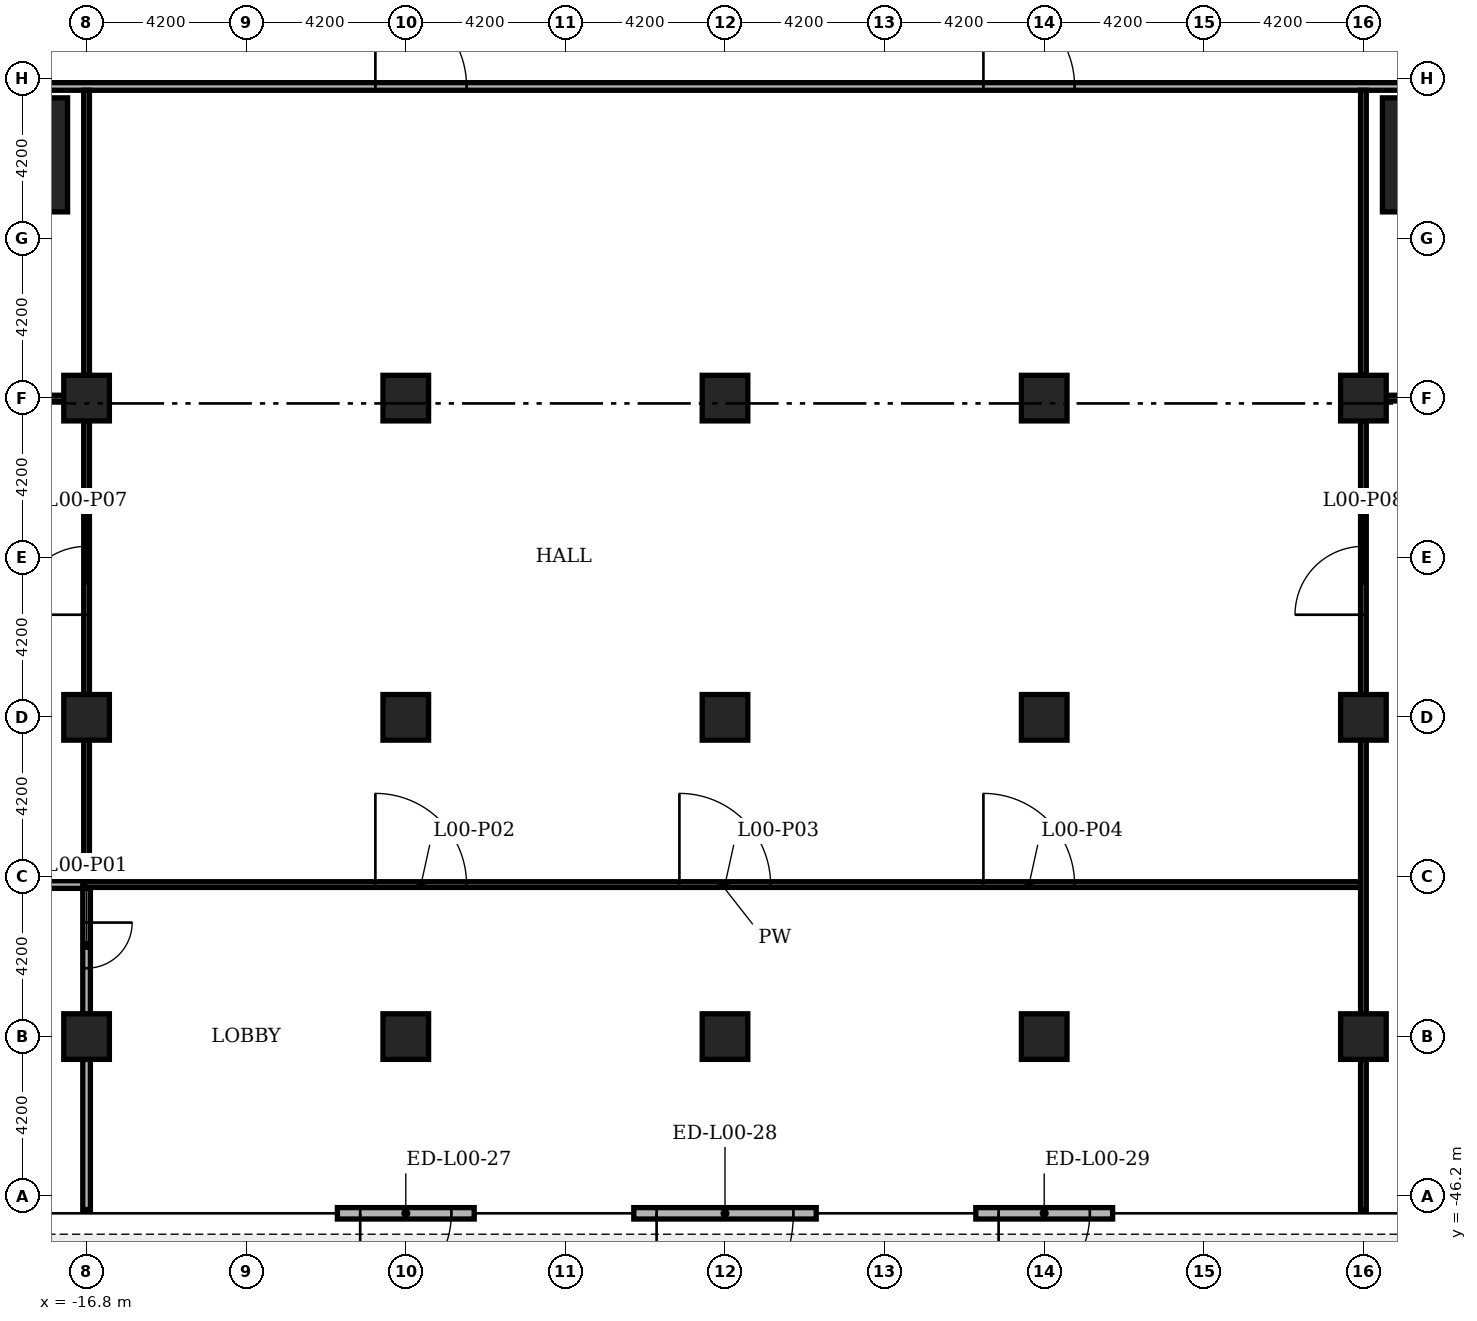
"""IFC4 building model, lengths in metres.
Left out: names, types, materials, properties, quantities, classifications, styles, units other than length and angle.
Written with IfcOpenShell. Run it as: python <this file> out.ifc"""

import sys

from ifc_helpers import new_model, si_unit, direction, frame, frame_2d, origin, origin_2d, place, context, subcontext, project, spatial, rectangle, extrude, element, fill, save


model = new_model("IFC4")
c1 = context("Model", 3, precision=1e-05, world=origin(), true_north=direction((0.0, 1.0)))
c2 = subcontext(c1, "Body", "Model", "MODEL_VIEW")
j1 = project(units=[si_unit("LENGTHUNIT", "METRE"), si_unit("PLANEANGLEUNIT", "RADIAN")], contexts=[c1])
p1 = place(None, origin())
s1 = spatial("IfcSite", under=j1, at=p1, CompositionType="ELEMENT")
p2 = place(p1, origin())
s2 = spatial("IfcBuilding", under=s1, at=p2, CompositionType="ELEMENT")
p3 = place(p2, origin())
s3 = spatial("IfcBuildingStorey", under=s2, at=p3, CompositionType="ELEMENT", Elevation=0.0)
for number, where, z_axis, x_axis in (
    (1, (18.8, -18.8, 0.0), (0.0, 0.0, 1.0), (1.0, 0.0, 0.0)),
    (2, (-18.8, -18.8, 0.0), (0.0, 0.0, 1.0), (1.0, 0.0, 0.0)),
):
    element("IfcColumn", number, at=place(p3, frame(where, z_axis=z_axis, x_axis=x_axis)), inside=s3, PredefinedType="COLUMN", context=c2, shape_type="SweptSolid", body=[
        extrude(rectangle(XDim=3.0, YDim=3.0, at=origin_2d()), origin(), (0.0, 0.0, 1.0), 7.2),
    ])
for number, where, z_axis, x_axis in (
    (3, (0.0, -25.2, 0.0), (0.0, 0.0, 1.0), (1.0, 0.0, 0.0)),
    (4, (8.4, -25.2, 0.0), (0.0, 0.0, 1.0), (1.0, 0.0, 0.0)),
    (5, (16.8, -25.2, 0.0), (0.0, 0.0, 1.0), (1.0, 0.0, 0.0)),
    (6, (-8.4, -25.2, 0.0), (0.0, 0.0, 1.0), (1.0, 0.0, 0.0)),
    (7, (-16.8, -25.2, 0.0), (0.0, 0.0, 1.0), (1.0, 0.0, 0.0)),
    (8, (0.0, -33.6, 0.0), (0.0, 0.0, 1.0), (1.0, 0.0, 0.0)),
    (9, (0.0, -42.0, 0.0), (0.0, 0.0, 1.0), (1.0, 0.0, 0.0)),
    (10, (8.4, -33.6, 0.0), (0.0, 0.0, 1.0), (1.0, 0.0, 0.0)),
    (11, (8.4, -42.0, 0.0), (0.0, 0.0, 1.0), (1.0, 0.0, 0.0)),
    (12, (16.8, -33.6, 0.0), (0.0, 0.0, 1.0), (1.0, 0.0, 0.0)),
    (13, (16.8, -42.0, 0.0), (0.0, 0.0, 1.0), (1.0, 0.0, 0.0)),
    (14, (-8.4, -33.6, 0.0), (0.0, 0.0, 1.0), (1.0, 0.0, 0.0)),
    (15, (-8.4, -42.0, 0.0), (0.0, 0.0, 1.0), (1.0, 0.0, 0.0)),
    (16, (-16.8, -33.6, 0.0), (0.0, 0.0, 1.0), (1.0, 0.0, 0.0)),
    (17, (-16.8, -42.0, 0.0), (0.0, 0.0, 1.0), (1.0, 0.0, 0.0)),
):
    element("IfcColumn", number, at=place(p3, frame(where, z_axis=z_axis, x_axis=x_axis)), inside=s3, PredefinedType="COLUMN", context=c2, shape_type="SweptSolid", body=[
        extrude(rectangle(XDim=1.2, YDim=1.2, at=origin_2d()), origin(), (0.0, 0.0, 1.0), 7.2),
    ])
p4 = place(p3, frame((-10.2, -46.65, 0.0), z_axis=(0.0, 0.0, 1.0), x_axis=(1.0, 0.0, 0.0)))
e18 = element("IfcWall", 18, at=p4, inside=s3, PredefinedType="STANDARD", context=c2, shape_type="SweptSolid", body=[
    extrude(rectangle(XDim=3.6, YDim=0.3, at=frame_2d((1.8, 0.0))), origin(), (0.0, 0.0, 1.0), 6.78),
])
p5 = place(p4, frame((0.6, 0.0, 0.0)))
e19 = element("IfcOpeningElement", 19, at=p5, cuts=e18, PredefinedType="OPENING", context=c2, shape_type="SweptSolid", body=[
    extrude(rectangle(XDim=2.4, YDim=3.6, at=frame_2d((1.2, 1.8))), frame((0.0, 0.16, 0.0), z_axis=(0.0, -1.0, 0.0), x_axis=(1.0, 0.0, 0.0)), (0.0, 0.0, 1.0), 0.32),
])
p6 = place(p3, frame((-2.4, -46.65, 0.0), z_axis=(0.0, 0.0, 1.0), x_axis=(1.0, 0.0, 0.0)))
e20 = element("IfcWall", 20, at=p6, inside=s3, PredefinedType="STANDARD", context=c2, shape_type="SweptSolid", body=[
    extrude(rectangle(XDim=4.8, YDim=0.3, at=frame_2d((2.4, 0.0))), origin(), (0.0, 0.0, 1.0), 6.78),
])
p7 = place(p6, frame((0.6, 0.0, 0.0)))
e21 = element("IfcOpeningElement", 21, at=p7, cuts=e20, PredefinedType="OPENING", context=c2, shape_type="SweptSolid", body=[
    extrude(rectangle(XDim=3.6, YDim=3.6, at=frame_2d((1.8, 1.8))), frame((0.0, 0.16, 0.0), z_axis=(0.0, -1.0, 0.0), x_axis=(1.0, 0.0, 0.0)), (0.0, 0.0, 1.0), 0.32),
])
p8 = place(p3, frame((6.6, -46.65, 0.0), z_axis=(0.0, 0.0, 1.0), x_axis=(1.0, 0.0, 0.0)))
e22 = element("IfcWall", 22, at=p8, inside=s3, PredefinedType="STANDARD", context=c2, shape_type="SweptSolid", body=[
    extrude(rectangle(XDim=3.6, YDim=0.3, at=frame_2d((1.8, 0.0))), origin(), (0.0, 0.0, 1.0), 6.78),
])
p9 = place(p8, frame((0.6, 0.0, 0.0)))
e23 = element("IfcOpeningElement", 23, at=p9, cuts=e22, PredefinedType="OPENING", context=c2, shape_type="SweptSolid", body=[
    extrude(rectangle(XDim=2.4, YDim=3.6, at=frame_2d((1.2, 1.8))), frame((0.0, 0.16, 0.0), z_axis=(0.0, -1.0, 0.0), x_axis=(1.0, 0.0, 0.0)), (0.0, 0.0, 1.0), 0.32),
])
p10 = place(p3, frame((-25.3, -38.0, 0.0), z_axis=(0.0, 0.0, 1.0), x_axis=(1.0, 0.0, 0.0)))
e24 = element("IfcWall", 24, at=p10, inside=s3, PredefinedType="PARTITIONING", context=c2, shape_type="SweptSolid", body=[
    extrude(rectangle(XDim=8.6, YDim=0.2, at=frame_2d((4.3, 0.0))), origin(), (0.0, 0.0, 1.0), 6.38),
])
p11 = place(p3, frame((-16.9, -38.0, 0.0), z_axis=(0.0, 0.0, 1.0), x_axis=(1.0, 0.0, 0.0)))
e25 = element("IfcWall", 25, at=p11, inside=s3, PredefinedType="PARTITIONING", context=c2, shape_type="SweptSolid", body=[
    extrude(rectangle(XDim=33.625, YDim=0.15, at=frame_2d((16.812, 0.0))), origin(), (0.0, 0.0, 1.0), 6.38),
])
p12 = place(p11, frame((7.7, 0.0, 0.0)))
e26 = element("IfcOpeningElement", 26, at=p12, cuts=e25, PredefinedType="OPENING", context=c2, shape_type="SweptSolid", body=[
    extrude(rectangle(XDim=2.4, YDim=2.4, at=frame_2d((1.2, 1.2))), frame((0.0, 0.085, 0.0), z_axis=(0.0, -1.0, 0.0), x_axis=(1.0, 0.0, 0.0)), (0.0, 0.0, 1.0), 0.17),
])
p13 = place(p11, frame((15.7, 0.0, 0.0)))
e27 = element("IfcOpeningElement", 27, at=p13, cuts=e25, PredefinedType="OPENING", context=c2, shape_type="SweptSolid", body=[
    extrude(rectangle(XDim=2.4, YDim=2.4, at=frame_2d((1.2, 1.2))), frame((0.0, 0.085, 0.0), z_axis=(0.0, -1.0, 0.0), x_axis=(1.0, 0.0, 0.0)), (0.0, 0.0, 1.0), 0.17),
])
p14 = place(p11, frame((23.7, 0.0, 0.0)))
e28 = element("IfcOpeningElement", 28, at=p14, cuts=e25, PredefinedType="OPENING", context=c2, shape_type="SweptSolid", body=[
    extrude(rectangle(XDim=2.4, YDim=2.4, at=frame_2d((1.2, 1.2))), frame((0.0, 0.085, 0.0), z_axis=(0.0, -1.0, 0.0), x_axis=(1.0, 0.0, 0.0)), (0.0, 0.0, 1.0), 0.17),
])
for number, where, z_axis, x_axis in (
    (29, (-21.95, -25.2, 0.0), (0.0, 0.0, 1.0), (1.0, 0.0, 0.0)),
    (30, (17.4, -25.2, 0.0), (0.0, 0.0, 1.0), (1.0, 0.0, 0.0)),
):
    element("IfcWall", number, at=place(p3, frame(where, z_axis=z_axis, x_axis=x_axis)), inside=s3, PredefinedType="PARTITIONING", context=c2, shape_type="SweptSolid", body=[
        extrude(rectangle(XDim=4.55, YDim=0.15, at=frame_2d((2.275, 0.0))), origin(), (0.0, 0.0, 1.0), 6.48),
    ])
p15 = place(p3, frame((-22.05, -17.0, 0.0), z_axis=(0.0, 0.0, 1.0), x_axis=(1.0, 0.0, 0.0)))
e31 = element("IfcWall", 31, at=p15, inside=s3, PredefinedType="PARTITIONING", context=c2, shape_type="SweptSolid", body=[
    extrude(rectangle(XDim=44.1, YDim=0.2, at=frame_2d((22.05, 0.0))), origin(), (0.0, 0.0, 1.0), 6.78),
])
p16 = place(p15, frame((0.55, 0.0, 0.0)))
e32 = element("IfcOpeningElement", 32, at=p16, cuts=e31, PredefinedType="OPENING", context=c2, shape_type="SweptSolid", body=[
    extrude(rectangle(XDim=1.0, YDim=2.1, at=frame_2d((0.5, 1.05))), frame((0.0, 0.11, 0.0), z_axis=(0.0, -1.0, 0.0), x_axis=(1.0, 0.0, 0.0)), (0.0, 0.0, 1.0), 0.22),
])
p17 = place(p15, frame((12.85, 0.0, 0.0)))
e33 = element("IfcOpeningElement", 33, at=p17, cuts=e31, PredefinedType="OPENING", context=c2, shape_type="SweptSolid", body=[
    extrude(rectangle(XDim=2.4, YDim=2.4, at=frame_2d((1.2, 1.2))), frame((0.0, 0.11, 0.0), z_axis=(0.0, -1.0, 0.0), x_axis=(1.0, 0.0, 0.0)), (0.0, 0.0, 1.0), 0.22),
])
p18 = place(p15, frame((28.85, 0.0, 0.0)))
e34 = element("IfcOpeningElement", 34, at=p18, cuts=e31, PredefinedType="OPENING", context=c2, shape_type="SweptSolid", body=[
    extrude(rectangle(XDim=2.4, YDim=2.4, at=frame_2d((1.2, 1.2))), frame((0.0, 0.11, 0.0), z_axis=(0.0, -1.0, 0.0), x_axis=(1.0, 0.0, 0.0)), (0.0, 0.0, 1.0), 0.22),
])
p19 = place(p15, frame((42.55, 0.0, 0.0)))
e35 = element("IfcOpeningElement", 35, at=p19, cuts=e31, PredefinedType="OPENING", context=c2, shape_type="SweptSolid", body=[
    extrude(rectangle(XDim=1.0, YDim=2.1, at=frame_2d((0.5, 1.05))), frame((0.0, 0.11, 0.0), z_axis=(0.0, -1.0, 0.0), x_axis=(1.0, 0.0, 0.0)), (0.0, 0.0, 1.0), 0.22),
])
p20 = place(p3, frame((-16.8, -46.55, 0.0), z_axis=(0.0, 0.0, 1.0), x_axis=(0.0, 1.0, 0.0)))
e36 = element("IfcWall", 36, at=p20, inside=s3, PredefinedType="PARTITIONING", context=c2, shape_type="SweptSolid", body=[
    extrude(rectangle(XDim=3.95, YDim=0.2, at=frame_2d((1.975, 0.0))), origin(), (0.0, 0.0, 1.0), 6.38),
])
p21 = place(p3, frame((-16.8, -41.4, 0.0), z_axis=(0.0, 0.0, 1.0), x_axis=(0.0, 1.0, 0.0)))
e37 = element("IfcWall", 37, at=p21, inside=s3, PredefinedType="PARTITIONING", context=c2, shape_type="SweptSolid", body=[
    extrude(rectangle(XDim=3.3, YDim=0.2, at=frame_2d((1.65, 0.0))), origin(), (0.0, 0.0, 1.0), 6.38),
])
p22 = place(p21, frame((1.2, 0.0, 0.0)))
e38 = element("IfcOpeningElement", 38, at=p22, cuts=e37, PredefinedType="OPENING", context=c2, shape_type="SweptSolid", body=[
    extrude(rectangle(XDim=1.2, YDim=2.2, at=frame_2d((0.6, 1.1))), frame((0.0, 0.11, 0.0), z_axis=(0.0, -1.0, 0.0), x_axis=(1.0, 0.0, 0.0)), (0.0, 0.0, 1.0), 0.22),
])
p23 = place(p3, frame((-16.8, -37.9, 0.0), z_axis=(0.0, 0.0, 1.0), x_axis=(0.0, 1.0, 0.0)))
e39 = element("IfcWall", 39, at=p23, inside=s3, PredefinedType="PARTITIONING", context=c2, shape_type="SweptSolid", body=[
    extrude(rectangle(XDim=3.7, YDim=0.15, at=frame_2d((1.85, 0.0))), origin(), (0.0, 0.0, 1.0), 6.38),
])
p24 = place(p3, frame((-16.8, -33.0, 0.0), z_axis=(0.0, 0.0, 1.0), x_axis=(0.0, 1.0, 0.0)))
e40 = element("IfcWall", 40, at=p24, inside=s3, PredefinedType="PARTITIONING", context=c2, shape_type="SweptSolid", body=[
    extrude(rectangle(XDim=7.2, YDim=0.15, at=frame_2d((3.6, 0.0))), origin(), (0.0, 0.0, 1.0), 6.38),
])
p25 = place(p24, frame((2.1, 0.0, 0.0)))
e41 = element("IfcOpeningElement", 41, at=p25, cuts=e40, PredefinedType="OPENING", context=c2, shape_type="SweptSolid", body=[
    extrude(rectangle(XDim=1.8, YDim=2.2, at=frame_2d((0.9, 1.1))), frame((0.0, 0.085, 0.0), z_axis=(0.0, -1.0, 0.0), x_axis=(1.0, 0.0, 0.0)), (0.0, 0.0, 1.0), 0.17),
])
p26 = place(p3, frame((-16.8, -24.6, 0.0), z_axis=(0.0, 0.0, 1.0), x_axis=(0.0, 1.0, 0.0)))
e42 = element("IfcWall", 42, at=p26, inside=s3, PredefinedType="PARTITIONING", context=c2, shape_type="SweptSolid", body=[
    extrude(rectangle(XDim=7.5, YDim=0.15, at=frame_2d((3.75, 0.0))), origin(), (0.0, 0.0, 1.0), 6.78),
])
p27 = place(p3, frame((16.8, -46.55, 0.0), z_axis=(0.0, 0.0, 1.0), x_axis=(0.0, 1.0, 0.0)))
e43 = element("IfcWall", 43, at=p27, inside=s3, PredefinedType="PARTITIONING", context=c2, shape_type="SweptSolid", body=[
    extrude(rectangle(XDim=3.95, YDim=0.15, at=frame_2d((1.975, 0.0))), origin(), (0.0, 0.0, 1.0), 6.38),
])
p28 = place(p3, frame((16.8, -41.4, 0.0), z_axis=(0.0, 0.0, 1.0), x_axis=(0.0, 1.0, 0.0)))
e44 = element("IfcWall", 44, at=p28, inside=s3, PredefinedType="PARTITIONING", context=c2, shape_type="SweptSolid", body=[
    extrude(rectangle(XDim=7.2, YDim=0.15, at=frame_2d((3.6, 0.0))), origin(), (0.0, 0.0, 1.0), 6.38),
])
p29 = place(p3, frame((16.8, -33.0, 0.0), z_axis=(0.0, 0.0, 1.0), x_axis=(0.0, 1.0, 0.0)))
e45 = element("IfcWall", 45, at=p29, inside=s3, PredefinedType="PARTITIONING", context=c2, shape_type="SweptSolid", body=[
    extrude(rectangle(XDim=7.2, YDim=0.15, at=frame_2d((3.6, 0.0))), origin(), (0.0, 0.0, 1.0), 6.38),
])
p30 = place(p29, frame((2.1, 0.0, 0.0)))
e46 = element("IfcOpeningElement", 46, at=p30, cuts=e45, PredefinedType="OPENING", context=c2, shape_type="SweptSolid", body=[
    extrude(rectangle(XDim=1.8, YDim=2.2, at=frame_2d((0.9, 1.1))), frame((0.0, 0.085, 0.0), z_axis=(0.0, -1.0, 0.0), x_axis=(1.0, 0.0, 0.0)), (0.0, 0.0, 1.0), 0.17),
])
p31 = place(p3, frame((16.8, -24.6, 0.0), z_axis=(0.0, 0.0, 1.0), x_axis=(0.0, 1.0, 0.0)))
e47 = element("IfcWall", 47, at=p31, inside=s3, PredefinedType="PARTITIONING", context=c2, shape_type="SweptSolid", body=[
    extrude(rectangle(XDim=7.5, YDim=0.15, at=frame_2d((3.75, 0.0))), origin(), (0.0, 0.0, 1.0), 6.78),
])
p32 = place(p5, frame((2.4, 0.0, 0.0), z_axis=(0.0, 0.0, 1.0), x_axis=(-1.0, 0.0, 0.0)))
e48 = element("IfcDoor", 48, at=p32, inside=s3, OperationType="DOUBLE_DOOR_SINGLE_SWING", PredefinedType="DOOR", context=c2, shape_type="SweptSolid", body=[
    extrude(rectangle(XDim=2.4, YDim=3.6, at=frame_2d((1.2, 1.8))), frame((0.0, 0.025, 0.0), z_axis=(0.0, -1.0, 0.0), x_axis=(1.0, 0.0, 0.0)), (0.0, 0.0, 1.0), 0.05),
])
fill(e19, e48)
p33 = place(p7, frame((3.6, 0.0, 0.0), z_axis=(0.0, 0.0, 1.0), x_axis=(-1.0, 0.0, 0.0)))
e49 = element("IfcDoor", 49, at=p33, inside=s3, OperationType="DOUBLE_DOOR_SINGLE_SWING", PredefinedType="DOOR", context=c2, shape_type="SweptSolid", body=[
    extrude(rectangle(XDim=3.6, YDim=3.6, at=frame_2d((1.8, 1.8))), frame((0.0, 0.025, 0.0), z_axis=(0.0, -1.0, 0.0), x_axis=(1.0, 0.0, 0.0)), (0.0, 0.0, 1.0), 0.05),
])
fill(e21, e49)
p34 = place(p9, frame((2.4, 0.0, 0.0), z_axis=(0.0, 0.0, 1.0), x_axis=(-1.0, 0.0, 0.0)))
e50 = element("IfcDoor", 50, at=p34, inside=s3, OperationType="DOUBLE_DOOR_SINGLE_SWING", PredefinedType="DOOR", context=c2, shape_type="SweptSolid", body=[
    extrude(rectangle(XDim=2.4, YDim=3.6, at=frame_2d((1.2, 1.8))), frame((0.0, 0.025, 0.0), z_axis=(0.0, -1.0, 0.0), x_axis=(1.0, 0.0, 0.0)), (0.0, 0.0, 1.0), 0.05),
])
fill(e23, e50)
p35 = place(p22, origin())
e51 = element("IfcDoor", 51, at=p35, inside=s3, OperationType="SINGLE_SWING_RIGHT", PredefinedType="DOOR", context=c2, shape_type="SweptSolid", body=[
    extrude(rectangle(XDim=1.2, YDim=2.2, at=frame_2d((0.6, 1.1))), frame((0.0, 0.025, 0.0), z_axis=(0.0, -1.0, 0.0), x_axis=(1.0, 0.0, 0.0)), (0.0, 0.0, 1.0), 0.05),
])
fill(e38, e51)
p36 = place(p12, origin())
e52 = element("IfcDoor", 52, at=p36, inside=s3, OperationType="DOUBLE_DOOR_SINGLE_SWING", PredefinedType="DOOR", context=c2, shape_type="SweptSolid", body=[
    extrude(rectangle(XDim=2.4, YDim=2.4, at=frame_2d((1.2, 1.2))), frame((0.0, 0.025, 0.0), z_axis=(0.0, -1.0, 0.0), x_axis=(1.0, 0.0, 0.0)), (0.0, 0.0, 1.0), 0.05),
])
fill(e26, e52)
p37 = place(p13, origin())
e53 = element("IfcDoor", 53, at=p37, inside=s3, OperationType="DOUBLE_DOOR_SINGLE_SWING", PredefinedType="DOOR", context=c2, shape_type="SweptSolid", body=[
    extrude(rectangle(XDim=2.4, YDim=2.4, at=frame_2d((1.2, 1.2))), frame((0.0, 0.025, 0.0), z_axis=(0.0, -1.0, 0.0), x_axis=(1.0, 0.0, 0.0)), (0.0, 0.0, 1.0), 0.05),
])
fill(e27, e53)
p38 = place(p14, origin())
e54 = element("IfcDoor", 54, at=p38, inside=s3, OperationType="DOUBLE_DOOR_SINGLE_SWING", PredefinedType="DOOR", context=c2, shape_type="SweptSolid", body=[
    extrude(rectangle(XDim=2.4, YDim=2.4, at=frame_2d((1.2, 1.2))), frame((0.0, 0.025, 0.0), z_axis=(0.0, -1.0, 0.0), x_axis=(1.0, 0.0, 0.0)), (0.0, 0.0, 1.0), 0.05),
])
fill(e28, e54)
p39 = place(p25, origin())
e55 = element("IfcDoor", 55, at=p39, inside=s3, OperationType="DOUBLE_DOOR_SINGLE_SWING", PredefinedType="DOOR", context=c2, shape_type="SweptSolid", body=[
    extrude(rectangle(XDim=1.8, YDim=2.2, at=frame_2d((0.9, 1.1))), frame((0.0, 0.025, 0.0), z_axis=(0.0, -1.0, 0.0), x_axis=(1.0, 0.0, 0.0)), (0.0, 0.0, 1.0), 0.05),
])
fill(e41, e55)
p40 = place(p30, origin())
e56 = element("IfcDoor", 56, at=p40, inside=s3, OperationType="DOUBLE_DOOR_SINGLE_SWING", PredefinedType="DOOR", context=c2, shape_type="SweptSolid", body=[
    extrude(rectangle(XDim=1.8, YDim=2.2, at=frame_2d((0.9, 1.1))), frame((0.0, 0.025, 0.0), z_axis=(0.0, -1.0, 0.0), x_axis=(1.0, 0.0, 0.0)), (0.0, 0.0, 1.0), 0.05),
])
fill(e46, e56)
p41 = place(p17, origin())
e57 = element("IfcDoor", 57, at=p41, inside=s3, OperationType="DOUBLE_DOOR_SINGLE_SWING", PredefinedType="DOOR", context=c2, shape_type="SweptSolid", body=[
    extrude(rectangle(XDim=2.4, YDim=2.4, at=frame_2d((1.2, 1.2))), frame((0.0, 0.025, 0.0), z_axis=(0.0, -1.0, 0.0), x_axis=(1.0, 0.0, 0.0)), (0.0, 0.0, 1.0), 0.05),
])
fill(e33, e57)
p42 = place(p18, origin())
e58 = element("IfcDoor", 58, at=p42, inside=s3, OperationType="DOUBLE_DOOR_SINGLE_SWING", PredefinedType="DOOR", context=c2, shape_type="SweptSolid", body=[
    extrude(rectangle(XDim=2.4, YDim=2.4, at=frame_2d((1.2, 1.2))), frame((0.0, 0.025, 0.0), z_axis=(0.0, -1.0, 0.0), x_axis=(1.0, 0.0, 0.0)), (0.0, 0.0, 1.0), 0.05),
])
fill(e34, e58)
save(model, sys.argv[1])
